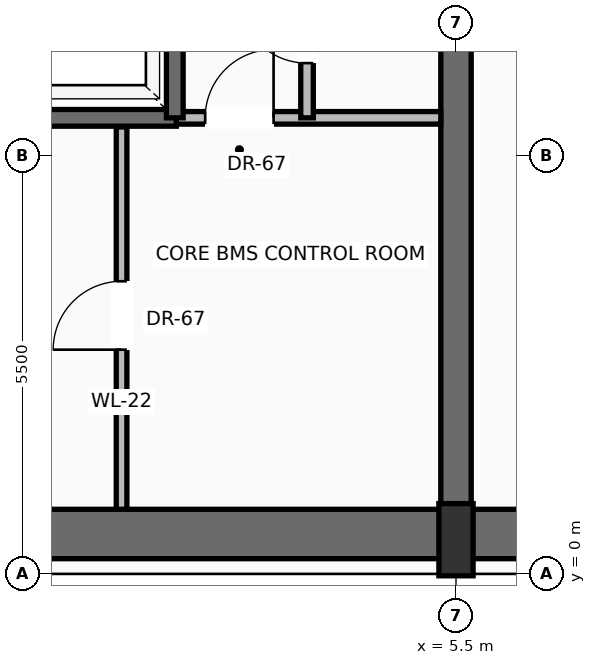
"""IFC4 building model, lengths in metres.
Left out: names, types, materials, properties, quantities, classifications, styles, units other than length and angle.
Written with IfcOpenShell. Run it as: python <this file> out.ifc"""

import sys

from ifc_helpers import new_model, si_unit, direction, frame, frame_2d, origin, origin_2d, place, context, subcontext, project, spatial, rectangle, extrude, source, transform, mapped, element, fill, save


model = new_model("IFC4")
c1 = context("Model", 3, precision=1e-05, world=origin(), true_north=direction((0.0, 1.0)))
c2 = subcontext(c1, "Body", "Model", "MODEL_VIEW")
j1 = project(units=[si_unit("LENGTHUNIT", "METRE"), si_unit("PLANEANGLEUNIT", "RADIAN")], contexts=[c1])
p1 = place(None, origin())
s1 = spatial("IfcSite", under=j1, at=p1, CompositionType="ELEMENT")
p2 = place(p1, origin())
s2 = spatial("IfcBuilding", under=s1, at=p2, CompositionType="ELEMENT")
p3 = place(p2, frame((0.0, 0.0, 162.6)))
s3 = spatial("IfcBuildingStorey", under=s2, at=p3, CompositionType="ELEMENT", Elevation=162.6)
p4 = place(p3, frame((-10.65, 0.525, 0.0), z_axis=(0.0, 0.0, 1.0), x_axis=(1.0, 0.0, 0.0)))
e1 = element("IfcWall", 1, at=p4, inside=s3, PredefinedType="SHEAR", context=c2, shape_type="SweptSolid", body=[
    extrude(rectangle(XDim=21.3, YDim=0.65, at=frame_2d((10.65, 0.0))), origin(), (0.0, 0.0, 1.0), 3.4),
])
p5 = place(p3, frame((5.5, 0.525, 0.0), z_axis=(0.0, 0.0, 1.0), x_axis=(0.0, 1.0, 0.0)))
e2 = element("IfcWall", 2, at=p5, inside=s3, PredefinedType="SHEAR", context=c2, shape_type="SweptSolid", body=[
    extrude(rectangle(XDim=15.55, YDim=0.4, at=frame_2d((7.775, 0.0))), origin(), (0.0, 0.0, 1.0), 3.4),
])
p6 = place(p5, frame((8.975, 0.0, 0.0)))
e3 = element("IfcOpeningElement", 3, at=p6, cuts=e2, PredefinedType="OPENING", context=c2, shape_type="SweptSolid", body=[
    extrude(rectangle(XDim=1.1, YDim=2.2, at=frame_2d((0.55, 1.1))), frame((0.0, 0.21, 0.0), z_axis=(0.0, -1.0, 0.0), x_axis=(1.0, 0.0, 0.0)), (0.0, 0.0, 1.0), 0.42),
])
m1 = source(origin(), c2, "Body", "SweptSolid", [
    extrude(rectangle(XDim=0.45, YDim=0.95, at=origin_2d()), origin(), (0.0, 0.0, 1.0), 3.7),
])
p7 = place(p3, frame((5.5, 0.45, 0.0), z_axis=(0.0, 0.0, 1.0), x_axis=(1.0, 0.0, 0.0)))
e4 = element("IfcColumn", 4, at=p7, inside=s3, PredefinedType="PILASTER", context=c2, shape_type="MappedRepresentation", body=[
    mapped(m1, transform((0.0, 0.0, 0.0), scale=1.0)),
])
p8 = place(p3, frame((1.82, 6.0, 0.0), z_axis=(0.0, 0.0, 1.0), x_axis=(1.0, 0.0, 0.0)))
e5 = element("IfcWall", 5, at=p8, inside=s3, PredefinedType="PARTITIONING", context=c2, shape_type="SweptSolid", body=[
    extrude(rectangle(XDim=3.48, YDim=0.165, at=frame_2d((1.74, 0.0))), origin(), (0.0, 0.0, 1.0), 3.392),
])
p9 = place(p8, frame((0.38, 0.0, 0.0)))
e6 = element("IfcOpeningElement", 6, at=p9, cuts=e5, PredefinedType="OPENING", context=c2, shape_type="SweptSolid", body=[
    extrude(rectangle(XDim=0.9, YDim=2.1, at=frame_2d((0.45, 1.05))), frame((0.0, 0.093, 0.0), z_axis=(0.0, -1.0, 0.0), x_axis=(1.0, 0.0, 0.0)), (0.0, 0.0, 1.0), 0.185),
])
p10 = place(p3, frame((1.1, 0.85, 0.0), z_axis=(0.0, 0.0, 1.0), x_axis=(0.0, 1.0, 0.0)))
e7 = element("IfcWall", 7, at=p10, inside=s3, PredefinedType="PARTITIONING", context=c2, shape_type="SweptSolid", body=[
    extrude(rectangle(XDim=5.03, YDim=0.14, at=frame_2d((2.515, 0.0))), origin(), (0.0, 0.0, 1.0), 3.392),
])
p11 = place(p10, frame((2.1, 0.0, 0.0)))
e8 = element("IfcOpeningElement", 8, at=p11, cuts=e7, PredefinedType="OPENING", context=c2, shape_type="SweptSolid", body=[
    extrude(rectangle(XDim=0.9, YDim=2.1, at=frame_2d((0.45, 1.05))), frame((0.0, 0.08, 0.0), z_axis=(0.0, -1.0, 0.0), x_axis=(1.0, 0.0, 0.0)), (0.0, 0.0, 1.0), 0.16),
])
p12 = place(p3, frame((3.54, 6.0, 0.0), z_axis=(0.0, 0.0, 1.0), x_axis=(0.0, 1.0, 0.0)))
e9 = element("IfcWall", 9, at=p12, inside=s3, PredefinedType="PARTITIONING", context=c2, shape_type="SweptSolid", body=[
    extrude(rectangle(XDim=2.34, YDim=0.165, at=frame_2d((1.17, 0.0))), origin(), (0.0, 0.0, 1.0), 3.392),
])
p13 = place(p12, frame((0.72, 0.0, 0.0)))
e10 = element("IfcOpeningElement", 10, at=p13, cuts=e9, PredefinedType="OPENING", context=c2, shape_type="SweptSolid", body=[
    extrude(rectangle(XDim=0.9, YDim=2.1, at=frame_2d((0.45, 1.05))), frame((0.0, 0.093, 0.0), z_axis=(0.0, -1.0, 0.0), x_axis=(1.0, 0.0, 0.0)), (0.0, 0.0, 1.0), 0.185),
])
p14 = place(p3, frame((-5.5, 6.0, 0.0), z_axis=(0.0, 0.0, 1.0), x_axis=(1.0, 0.0, 0.0)))
e11 = element("IfcWall", 11, at=p14, inside=s3, PredefinedType="SOLIDWALL", context=c2, shape_type="SweptSolid", body=[
    extrude(rectangle(XDim=7.32, YDim=0.22, at=frame_2d((3.66, 0.0))), origin(), (0.0, 0.0, 1.0), 3.4),
])
p15 = place(p3, frame((1.8, 6.0, 0.0), z_axis=(0.0, 0.0, 1.0), x_axis=(0.0, 1.0, 0.0)))
e12 = element("IfcWall", 12, at=p15, inside=s3, PredefinedType="SOLIDWALL", context=c2, shape_type="SweptSolid", body=[
    extrude(rectangle(XDim=2.3, YDim=0.22, at=frame_2d((1.15, 0.0))), origin(), (0.0, 0.0, 1.0), 3.4),
])
m2 = source(origin(), c2, "Body", "SweptSolid", [
    extrude(rectangle(XDim=0.9, YDim=2.1, at=frame_2d((0.45, 1.05))), frame((0.0, 0.025, 0.0), z_axis=(0.0, -1.0, 0.0), x_axis=(1.0, 0.0, 0.0)), (0.0, 0.0, 1.0), 0.05),
])
p16 = place(p9, origin())
e13 = element("IfcDoor", 13, at=p16, inside=s3, OperationType="SINGLE_SWING_RIGHT", PredefinedType="DOOR", context=c2, shape_type="MappedRepresentation", body=[
    mapped(m2, transform((0.0, 0.0, 0.0), scale=1.0)),
])
fill(e6, e13)
p17 = place(p11, origin())
e14 = element("IfcDoor", 14, at=p17, inside=s3, OperationType="SINGLE_SWING_LEFT", PredefinedType="DOOR", context=c2, shape_type="MappedRepresentation", body=[
    mapped(m2, transform((0.0, 0.0, 0.0), scale=1.0)),
])
fill(e8, e14)
p18 = place(p13, origin())
e15 = element("IfcDoor", 15, at=p18, inside=s3, OperationType="SINGLE_SWING_RIGHT", PredefinedType="DOOR", context=c2, shape_type="MappedRepresentation", body=[
    mapped(m2, transform((0.0, 0.0, 0.0), scale=1.0)),
])
fill(e10, e15)
save(model, sys.argv[1])
